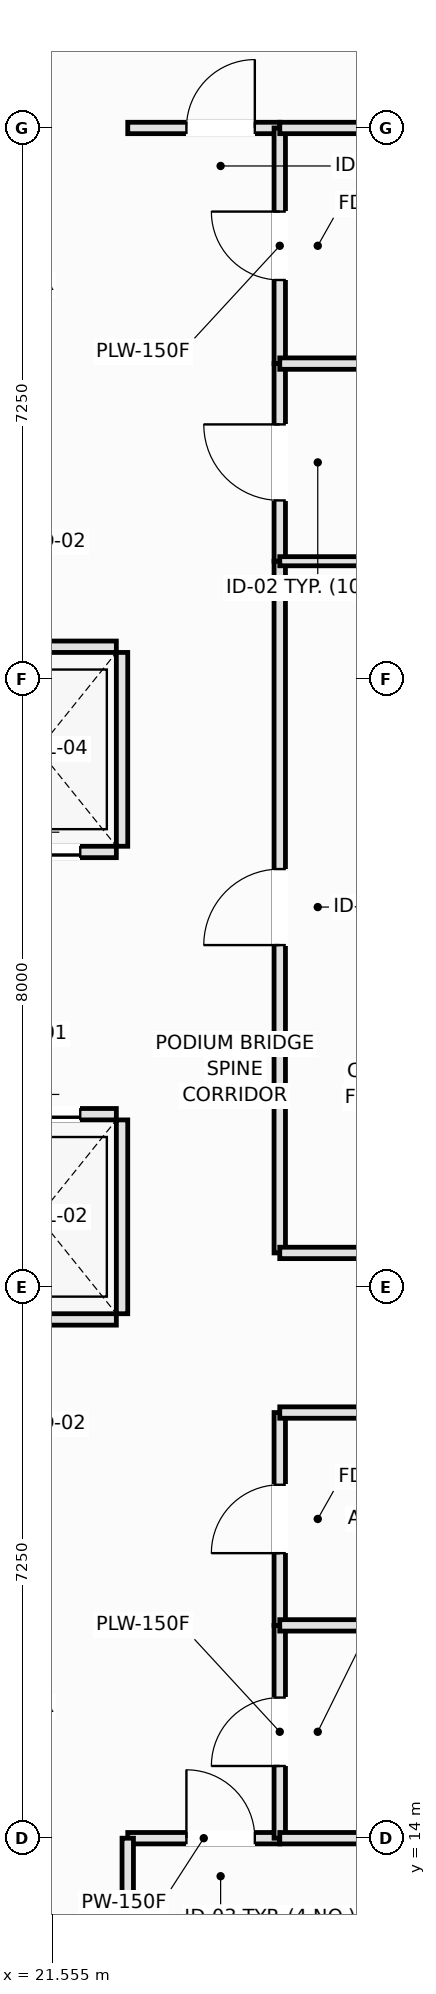
"""IFC4 building model, lengths in metres.
Left out: names, types, materials, properties, quantities, classifications, styles, units other than length and angle.
Written with IfcOpenShell. Run it as: python <this file> out.ifc"""

import sys

from ifc_helpers import new_model, si_unit, direction, frame, frame_2d, origin, place, context, subcontext, project, spatial, rectangle, extrude, element, fill, save


model = new_model("IFC4")
c1 = context("Model", 3, precision=1e-05, world=origin(), true_north=direction((0.0, 1.0)))
c2 = subcontext(c1, "Body", "Model", "MODEL_VIEW")
j1 = project(units=[si_unit("LENGTHUNIT", "METRE"), si_unit("PLANEANGLEUNIT", "RADIAN")], contexts=[c1])
p1 = place(None, origin())
s1 = spatial("IfcSite", under=j1, at=p1, CompositionType="ELEMENT")
p2 = place(p1, origin())
s2 = spatial("IfcBuilding", under=s1, at=p2, CompositionType="ELEMENT")
p3 = place(p2, frame((0.0, 0.0, 6.0)))
s3 = spatial("IfcBuildingStorey", under=s2, at=p3, CompositionType="ELEMENT", Elevation=6.0)
p4 = place(p3, frame((20.35, 20.825, 0.0), z_axis=(0.0, 0.0, 1.0), x_axis=(1.0, 0.0, 0.0)))
e1 = element("IfcWall", 1, at=p4, inside=s3, PredefinedType="PARTITIONING", context=c2, shape_type="SweptSolid", body=[
    extrude(rectangle(XDim=2.05, YDim=0.15, at=frame_2d((1.025, 0.0))), origin(), (0.0, 0.0, 1.0), 4.6),
])
p5 = place(p3, frame((20.35, 23.525, 0.0), z_axis=(0.0, 0.0, 1.0), x_axis=(1.0, 0.0, 0.0)))
e2 = element("IfcWall", 2, at=p5, inside=s3, PredefinedType="PARTITIONING", context=c2, shape_type="SweptSolid", body=[
    extrude(rectangle(XDim=2.05, YDim=0.15, at=frame_2d((1.025, 0.0))), origin(), (0.0, 0.0, 1.0), 4.6),
])
p6 = place(p5, frame((0.475, 0.0, 0.0)))
e3 = element("IfcOpeningElement", 3, at=p6, cuts=e2, PredefinedType="OPENING", context=c2, shape_type="SweptSolid", body=[
    extrude(rectangle(XDim=1.1, YDim=2.2, at=frame_2d((0.55, 1.1))), frame((0.0, 0.085, 0.0), z_axis=(0.0, -1.0, 0.0), x_axis=(1.0, 0.0, 0.0)), (0.0, 0.0, 1.0), 0.17),
])
p7 = place(p3, frame((22.475, 20.9, 0.0), z_axis=(0.0, 0.0, 1.0), x_axis=(0.0, 1.0, 0.0)))
e4 = element("IfcWall", 4, at=p7, inside=s3, PredefinedType="PARTITIONING", context=c2, shape_type="SweptSolid", body=[
    extrude(rectangle(XDim=2.55, YDim=0.15, at=frame_2d((1.275, 0.0))), origin(), (0.0, 0.0, 1.0), 4.6),
])
p8 = place(p3, frame((20.35, 26.975, 0.0), z_axis=(0.0, 0.0, 1.0), x_axis=(1.0, 0.0, 0.0)))
e5 = element("IfcWall", 5, at=p8, inside=s3, PredefinedType="PARTITIONING", context=c2, shape_type="SweptSolid", body=[
    extrude(rectangle(XDim=2.05, YDim=0.15, at=frame_2d((1.025, 0.0))), origin(), (0.0, 0.0, 1.0), 4.6),
])
p9 = place(p8, frame((0.475, 0.0, 0.0)))
e6 = element("IfcOpeningElement", 6, at=p9, cuts=e5, PredefinedType="OPENING", context=c2, shape_type="SweptSolid", body=[
    extrude(rectangle(XDim=1.1, YDim=2.2, at=frame_2d((0.55, 1.1))), frame((0.0, 0.085, 0.0), z_axis=(0.0, -1.0, 0.0), x_axis=(1.0, 0.0, 0.0)), (0.0, 0.0, 1.0), 0.17),
])
p10 = place(p3, frame((20.35, 29.675, 0.0), z_axis=(0.0, 0.0, 1.0), x_axis=(1.0, 0.0, 0.0)))
e7 = element("IfcWall", 7, at=p10, inside=s3, PredefinedType="PARTITIONING", context=c2, shape_type="SweptSolid", body=[
    extrude(rectangle(XDim=2.05, YDim=0.15, at=frame_2d((1.025, 0.0))), origin(), (0.0, 0.0, 1.0), 4.6),
])
p11 = place(p3, frame((22.475, 27.05, 0.0), z_axis=(0.0, 0.0, 1.0), x_axis=(0.0, 1.0, 0.0)))
e8 = element("IfcWall", 8, at=p11, inside=s3, PredefinedType="PARTITIONING", context=c2, shape_type="SweptSolid", body=[
    extrude(rectangle(XDim=2.55, YDim=0.15, at=frame_2d((1.275, 0.0))), origin(), (0.0, 0.0, 1.0), 4.6),
])
p12 = place(p3, frame((22.55, 14.0, 0.0), z_axis=(0.0, 0.0, 1.0), x_axis=(1.0, 0.0, 0.0)))
e9 = element("IfcWall", 9, at=p12, inside=s3, PredefinedType="PARTITIONING", context=c2, shape_type="SweptSolid", body=[
    extrude(rectangle(XDim=2.0, YDim=0.15, at=frame_2d((1.0, 0.0))), origin(), (0.0, 0.0, 1.0), 4.6),
])
p13 = place(p12, frame((0.772, 0.0, 0.0)))
e10 = element("IfcOpeningElement", 10, at=p13, cuts=e9, PredefinedType="OPENING", context=c2, shape_type="SweptSolid", body=[
    extrude(rectangle(XDim=0.9, YDim=2.1, at=frame_2d((0.45, 1.05))), frame((0.0, 0.085, 0.0), z_axis=(0.0, -1.0, 0.0), x_axis=(1.0, 0.0, 0.0)), (0.0, 0.0, 1.0), 0.17),
])
p14 = place(p3, frame((22.55, 36.5, 0.0), z_axis=(0.0, 0.0, 1.0), x_axis=(1.0, 0.0, 0.0)))
e11 = element("IfcWall", 11, at=p14, inside=s3, PredefinedType="PARTITIONING", context=c2, shape_type="SweptSolid", body=[
    extrude(rectangle(XDim=2.0, YDim=0.15, at=frame_2d((1.0, 0.0))), origin(), (0.0, 0.0, 1.0), 4.6),
])
p15 = place(p14, frame((0.772, 0.0, 0.0)))
e12 = element("IfcOpeningElement", 12, at=p15, cuts=e11, PredefinedType="OPENING", context=c2, shape_type="SweptSolid", body=[
    extrude(rectangle(XDim=0.9, YDim=2.1, at=frame_2d((0.45, 1.05))), frame((0.0, 0.085, 0.0), z_axis=(0.0, -1.0, 0.0), x_axis=(1.0, 0.0, 0.0)), (0.0, 0.0, 1.0), 0.17),
])
p16 = place(p3, frame((24.55, 14.0, 0.0), z_axis=(0.0, 0.0, 1.0), x_axis=(0.0, 1.0, 0.0)))
e13 = element("IfcWall", 13, at=p16, inside=s3, PredefinedType="PLUMBINGWALL", context=c2, shape_type="SweptSolid", body=[
    extrude(rectangle(XDim=2.8, YDim=0.15, at=frame_2d((1.4, 0.0))), origin(), (0.0, 0.0, 1.0), 4.6),
])
p17 = place(p16, frame((0.95, 0.0, 0.0)))
e14 = element("IfcOpeningElement", 14, at=p17, cuts=e13, PredefinedType="OPENING", context=c2, shape_type="SweptSolid", body=[
    extrude(rectangle(XDim=0.9, YDim=2.1, at=frame_2d((0.45, 1.05))), frame((0.0, 0.085, 0.0), z_axis=(0.0, -1.0, 0.0), x_axis=(1.0, 0.0, 0.0)), (0.0, 0.0, 1.0), 0.17),
])
p18 = place(p3, frame((24.55, 33.4, 0.0), z_axis=(0.0, 0.0, 1.0), x_axis=(0.0, 1.0, 0.0)))
e15 = element("IfcWall", 15, at=p18, inside=s3, PredefinedType="PLUMBINGWALL", context=c2, shape_type="SweptSolid", body=[
    extrude(rectangle(XDim=3.1, YDim=0.15, at=frame_2d((1.55, 0.0))), origin(), (0.0, 0.0, 1.0), 4.6),
])
p19 = place(p18, frame((1.1, 0.0, 0.0)))
e16 = element("IfcOpeningElement", 16, at=p19, cuts=e15, PredefinedType="OPENING", context=c2, shape_type="SweptSolid", body=[
    extrude(rectangle(XDim=0.9, YDim=2.1, at=frame_2d((0.45, 1.05))), frame((0.0, 0.085, 0.0), z_axis=(0.0, -1.0, 0.0), x_axis=(1.0, 0.0, 0.0)), (0.0, 0.0, 1.0), 0.17),
])
p20 = place(p3, frame((24.55, 16.8, 0.0), z_axis=(0.0, 0.0, 1.0), x_axis=(0.0, 1.0, 0.0)))
e17 = element("IfcWall", 17, at=p20, inside=s3, PredefinedType="PLUMBINGWALL", context=c2, shape_type="SweptSolid", body=[
    extrude(rectangle(XDim=2.8, YDim=0.15, at=frame_2d((1.4, 0.0))), origin(), (0.0, 0.0, 1.0), 4.6),
])
p21 = place(p20, frame((0.95, 0.0, 0.0)))
e18 = element("IfcOpeningElement", 18, at=p21, cuts=e17, PredefinedType="OPENING", context=c2, shape_type="SweptSolid", body=[
    extrude(rectangle(XDim=0.9, YDim=2.1, at=frame_2d((0.45, 1.05))), frame((0.0, 0.085, 0.0), z_axis=(0.0, -1.0, 0.0), x_axis=(1.0, 0.0, 0.0)), (0.0, 0.0, 1.0), 0.17),
])
p22 = place(p3, frame((24.55, 30.8, 0.0), z_axis=(0.0, 0.0, 1.0), x_axis=(0.0, 1.0, 0.0)))
e19 = element("IfcWall", 19, at=p22, inside=s3, PredefinedType="PARTITIONING", context=c2, shape_type="SweptSolid", body=[
    extrude(rectangle(XDim=2.6, YDim=0.15, at=frame_2d((1.3, 0.0))), origin(), (0.0, 0.0, 1.0), 4.6),
])
p23 = place(p22, frame((0.8, 0.0, 0.0)))
e20 = element("IfcOpeningElement", 20, at=p23, cuts=e19, PredefinedType="OPENING", context=c2, shape_type="SweptSolid", body=[
    extrude(rectangle(XDim=1.0, YDim=2.15, at=frame_2d((0.5, 1.075))), frame((0.0, 0.085, 0.0), z_axis=(0.0, -1.0, 0.0), x_axis=(1.0, 0.0, 0.0)), (0.0, 0.0, 1.0), 0.17),
])
p24 = place(p3, frame((24.55, 21.7, 0.0), z_axis=(0.0, 0.0, 1.0), x_axis=(0.0, 1.0, 0.0)))
e21 = element("IfcWall", 21, at=p24, inside=s3, PredefinedType="PARTITIONING", context=c2, shape_type="SweptSolid", body=[
    extrude(rectangle(XDim=9.1, YDim=0.15, at=frame_2d((4.55, 0.0))), origin(), (0.0, 0.0, 1.0), 4.6),
])
p25 = place(p24, frame((4.05, 0.0, 0.0)))
e22 = element("IfcOpeningElement", 22, at=p25, cuts=e21, PredefinedType="OPENING", context=c2, shape_type="SweptSolid", body=[
    extrude(rectangle(XDim=1.0, YDim=2.15, at=frame_2d((0.5, 1.075))), frame((0.0, 0.085, 0.0), z_axis=(0.0, -1.0, 0.0), x_axis=(1.0, 0.0, 0.0)), (0.0, 0.0, 1.0), 0.17),
])
p26 = place(p3, frame((22.55, 11.75, 0.0), z_axis=(0.0, 0.0, 1.0), x_axis=(0.0, 1.0, 0.0)))
e23 = element("IfcWall", 23, at=p26, inside=s3, PredefinedType="PARTITIONING", context=c2, shape_type="SweptSolid", body=[
    extrude(rectangle(XDim=2.25, YDim=0.15, at=frame_2d((1.125, 0.0))), origin(), (0.0, 0.0, 1.0), 4.6),
])
p27 = place(p3, frame((24.55, 19.6, 0.0), z_axis=(0.0, 0.0, 1.0), x_axis=(1.0, 0.0, 0.0)))
e24 = element("IfcWall", 24, at=p27, inside=s3, PredefinedType="PLUMBINGWALL", context=c2, shape_type="SweptSolid", body=[
    extrude(rectangle(XDim=3.85, YDim=0.15, at=frame_2d((1.925, 0.0))), origin(), (0.0, 0.0, 1.0), 4.6),
])
p28 = place(p3, frame((24.55, 21.7, 0.0), z_axis=(0.0, 0.0, 1.0), x_axis=(1.0, 0.0, 0.0)))
e25 = element("IfcWall", 25, at=p28, inside=s3, PredefinedType="PARTITIONING", context=c2, shape_type="SweptSolid", body=[
    extrude(rectangle(XDim=3.85, YDim=0.15, at=frame_2d((1.925, 0.0))), origin(), (0.0, 0.0, 1.0), 4.6),
])
for number, where, z_axis, x_axis in (
    (26, (24.55, 14.0, 0.0), (0.0, 0.0, 1.0), (1.0, 0.0, 0.0)),
    (27, (24.55, 36.5, 0.0), (0.0, 0.0, 1.0), (1.0, 0.0, 0.0)),
    (28, (24.55, 16.8, 0.0), (0.0, 0.0, 1.0), (1.0, 0.0, 0.0)),
    (29, (24.55, 33.4, 0.0), (0.0, 0.0, 1.0), (1.0, 0.0, 0.0)),
):
    element("IfcWall", number, at=place(p3, frame(where, z_axis=z_axis, x_axis=x_axis)), inside=s3, PredefinedType="PLUMBINGWALL", context=c2, shape_type="SweptSolid", body=[
        extrude(rectangle(XDim=3.85, YDim=0.15, at=frame_2d((1.925, 0.0))), origin(), (0.0, 0.0, 1.0), 4.6),
    ])
p29 = place(p3, frame((24.55, 30.8, 0.0), z_axis=(0.0, 0.0, 1.0), x_axis=(1.0, 0.0, 0.0)))
e30 = element("IfcWall", 30, at=p29, inside=s3, PredefinedType="PARTITIONING", context=c2, shape_type="SweptSolid", body=[
    extrude(rectangle(XDim=3.85, YDim=0.12, at=frame_2d((1.925, 0.0))), origin(), (0.0, 0.0, 1.0), 4.6),
])
p30 = place(p6, origin())
e31 = element("IfcDoor", 31, at=p30, inside=s3, OperationType="DOUBLE_DOOR_SLIDING", PredefinedType="DOOR", context=c2, shape_type="SweptSolid", body=[
    extrude(rectangle(XDim=1.1, YDim=2.2, at=frame_2d((0.55, 1.1))), frame((0.0, 0.025, 0.0), z_axis=(0.0, -1.0, 0.0), x_axis=(1.0, 0.0, 0.0)), (0.0, 0.0, 1.0), 0.05),
])
fill(e3, e31)
p31 = place(p9, origin())
e32 = element("IfcDoor", 32, at=p31, inside=s3, OperationType="DOUBLE_DOOR_SLIDING", PredefinedType="DOOR", context=c2, shape_type="SweptSolid", body=[
    extrude(rectangle(XDim=1.1, YDim=2.2, at=frame_2d((0.55, 1.1))), frame((0.0, 0.025, 0.0), z_axis=(0.0, -1.0, 0.0), x_axis=(1.0, 0.0, 0.0)), (0.0, 0.0, 1.0), 0.05),
])
fill(e6, e32)
p32 = place(p13, origin())
e33 = element("IfcDoor", 33, at=p32, inside=s3, OperationType="SINGLE_SWING_LEFT", PredefinedType="DOOR", context=c2, shape_type="SweptSolid", body=[
    extrude(rectangle(XDim=0.9, YDim=2.1, at=frame_2d((0.45, 1.05))), frame((0.0, 0.025, 0.0), z_axis=(0.0, -1.0, 0.0), x_axis=(1.0, 0.0, 0.0)), (0.0, 0.0, 1.0), 0.05),
])
fill(e10, e33)
p33 = place(p15, origin())
e34 = element("IfcDoor", 34, at=p33, inside=s3, OperationType="SINGLE_SWING_RIGHT", PredefinedType="DOOR", context=c2, shape_type="SweptSolid", body=[
    extrude(rectangle(XDim=0.9, YDim=2.1, at=frame_2d((0.45, 1.05))), frame((0.0, 0.025, 0.0), z_axis=(0.0, -1.0, 0.0), x_axis=(1.0, 0.0, 0.0)), (0.0, 0.0, 1.0), 0.05),
])
fill(e12, e34)
p34 = place(p17, origin())
e35 = element("IfcDoor", 35, at=p34, inside=s3, OperationType="SINGLE_SWING_LEFT", PredefinedType="DOOR", context=c2, shape_type="SweptSolid", body=[
    extrude(rectangle(XDim=0.9, YDim=2.1, at=frame_2d((0.45, 1.05))), frame((0.0, 0.025, 0.0), z_axis=(0.0, -1.0, 0.0), x_axis=(1.0, 0.0, 0.0)), (0.0, 0.0, 1.0), 0.05),
])
fill(e14, e35)
p35 = place(p19, origin())
e36 = element("IfcDoor", 36, at=p35, inside=s3, OperationType="SINGLE_SWING_RIGHT", PredefinedType="DOOR", context=c2, shape_type="SweptSolid", body=[
    extrude(rectangle(XDim=0.9, YDim=2.1, at=frame_2d((0.45, 1.05))), frame((0.0, 0.025, 0.0), z_axis=(0.0, -1.0, 0.0), x_axis=(1.0, 0.0, 0.0)), (0.0, 0.0, 1.0), 0.05),
])
fill(e16, e36)
p36 = place(p21, origin())
e37 = element("IfcDoor", 37, at=p36, inside=s3, OperationType="SINGLE_SWING_LEFT", PredefinedType="DOOR", context=c2, shape_type="SweptSolid", body=[
    extrude(rectangle(XDim=0.9, YDim=2.1, at=frame_2d((0.45, 1.05))), frame((0.0, 0.025, 0.0), z_axis=(0.0, -1.0, 0.0), x_axis=(1.0, 0.0, 0.0)), (0.0, 0.0, 1.0), 0.05),
])
fill(e18, e37)
p37 = place(p23, origin())
e38 = element("IfcDoor", 38, at=p37, inside=s3, OperationType="SINGLE_SWING_RIGHT", PredefinedType="DOOR", context=c2, shape_type="SweptSolid", body=[
    extrude(rectangle(XDim=1.0, YDim=2.15, at=frame_2d((0.5, 1.075))), frame((0.0, 0.025, 0.0), z_axis=(0.0, -1.0, 0.0), x_axis=(1.0, 0.0, 0.0)), (0.0, 0.0, 1.0), 0.05),
])
fill(e20, e38)
p38 = place(p25, origin())
e39 = element("IfcDoor", 39, at=p38, inside=s3, OperationType="SINGLE_SWING_LEFT", PredefinedType="DOOR", context=c2, shape_type="SweptSolid", body=[
    extrude(rectangle(XDim=1.0, YDim=2.15, at=frame_2d((0.5, 1.075))), frame((0.0, 0.025, 0.0), z_axis=(0.0, -1.0, 0.0), x_axis=(1.0, 0.0, 0.0)), (0.0, 0.0, 1.0), 0.05),
])
fill(e22, e39)
save(model, sys.argv[1])
